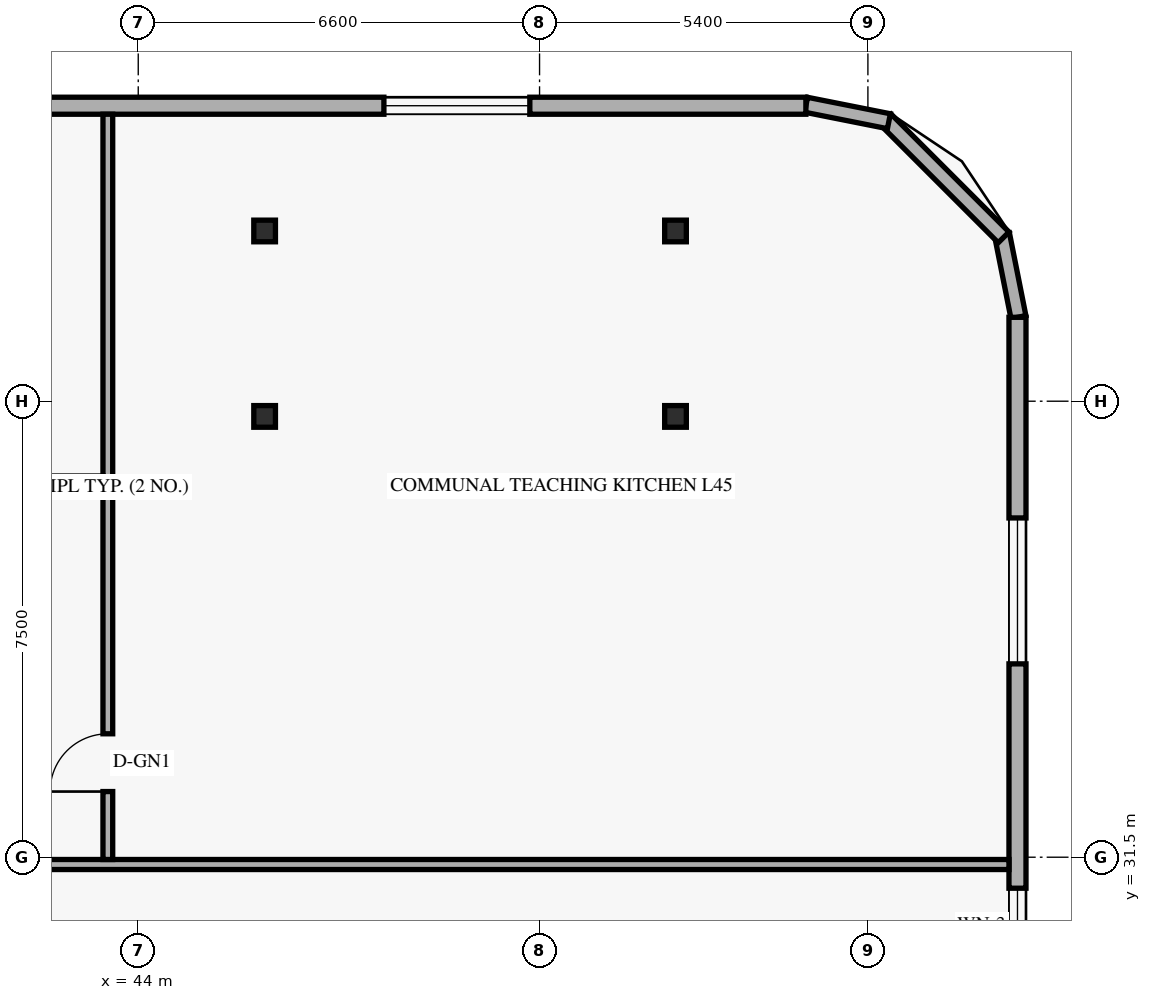
"""IFC4 building model, lengths in metres.
Left out: names, types, materials, properties, quantities, classifications, styles, units other than length and angle.
Written with IfcOpenShell. Run it as: python <this file> out.ifc"""

import sys

from ifc_helpers import new_model, si_unit, direction, frame, frame_2d, origin, origin_2d, place, context, subcontext, project, spatial, rectangle, hollow_rectangle, extrude, element, fill, save


model = new_model("IFC4")
c1 = context("Model", 3, precision=1e-05, world=origin(), true_north=direction((0.0, 1.0)))
c2 = subcontext(c1, "Body", "Model", "MODEL_VIEW")
j1 = project(units=[si_unit("LENGTHUNIT", "METRE"), si_unit("PLANEANGLEUNIT", "RADIAN")], contexts=[c1])
p1 = place(None, origin())
s1 = spatial("IfcSite", under=j1, at=p1, CompositionType="ELEMENT")
p2 = place(p1, origin())
s2 = spatial("IfcBuilding", under=s1, at=p2, CompositionType="ELEMENT")
p3 = place(p2, frame((0.0, 0.0, 173.4)))
s3 = spatial("IfcBuildingStorey", under=s2, at=p3, CompositionType="ELEMENT", Elevation=173.4)
for number, where, z_axis, x_axis in (
    (1, (46.005, 38.75, 0.0), (0.035, 0.0, 0.999), (0.0, 1.0, 0.0)),
    (2, (46.005, 41.8, 0.0), (0.035, 0.0, 0.999), (0.0, 1.0, 0.0)),
):
    element("IfcColumn", number, at=place(p3, frame(where, z_axis=z_axis, x_axis=x_axis)), inside=s3, PredefinedType="COLUMN", context=c2, shape_type="SweptSolid", body=[
        extrude(hollow_rectangle(XDim=0.356, YDim=0.356, WallThickness=0.016, at=origin_2d()), origin(), (0.0, 0.0, 1.0), 4.203),
    ])
for number, where, z_axis, x_axis in (
    (3, (52.714, 38.75, 0.0), (0.058, 0.0, 0.998), (0.0, 1.0, 0.0)),
    (4, (52.714, 41.8, 0.0), (0.058, 0.0, 0.998), (0.0, 1.0, 0.0)),
):
    element("IfcColumn", number, at=place(p3, frame(where, z_axis=z_axis, x_axis=x_axis)), inside=s3, PredefinedType="COLUMN", context=c2, shape_type="SweptSolid", body=[
        extrude(hollow_rectangle(XDim=0.356, YDim=0.356, WallThickness=0.016, at=origin_2d()), origin(), (0.0, 0.0, 1.0), 4.207),
    ])
p4 = place(p3, frame((58.476, 40.384, 0.0), z_axis=(0.0, 0.0, 1.0), x_axis=(-0.19496651342, 0.980809899341, 0.0)))
e5 = element("IfcWall", 5, at=p4, inside=s3, PredefinedType="SOLIDWALL", context=c2, shape_type="SweptSolid", body=[
    extrude(rectangle(XDim=1.389, YDim=0.25, at=frame_2d((0.694, 0.0))), origin(), (0.0, 0.0, 1.0), 3.96),
])
p5 = place(p3, frame((58.232, 41.695, 0.0), z_axis=(0.0, 0.0, 1.0), x_axis=(-0.707106781187, 0.707106781187, 0.0)))
e6 = element("IfcWall", 6, at=p5, inside=s3, PredefinedType="SOLIDWALL", context=c2, shape_type="SweptSolid", body=[
    extrude(rectangle(XDim=2.739, YDim=0.25, at=frame_2d((1.37, 0.0))), origin(), (0.0, 0.0, 1.0), 3.96),
])
p6 = place(p3, frame((56.345, 43.605, 0.0), z_axis=(0.0, 0.0, 1.0), x_axis=(-0.980809899341, 0.19496651342, 0.0)))
e7 = element("IfcWall", 7, at=p6, inside=s3, PredefinedType="SOLIDWALL", context=c2, shape_type="SweptSolid", body=[
    extrude(rectangle(XDim=1.389, YDim=0.25, at=frame_2d((0.694, 0.0))), origin(), (0.0, 0.0, 1.0), 3.96),
])
p7 = place(p3, frame((58.46, 29.4, 0.0), z_axis=(0.0, 0.0, 1.0), x_axis=(0.0, 1.0, 0.0)))
e8 = element("IfcWall", 8, at=p7, inside=s3, PredefinedType="SOLIDWALL", context=c2, shape_type="SweptSolid", body=[
    extrude(rectangle(XDim=10.98, YDim=0.28, at=frame_2d((5.49, 0.0))), origin(), (0.0, 0.0, 1.0), 3.96),
])
p8 = place(p7, frame((0.39, 0.0, 0.85)))
e9 = element("IfcOpeningElement", 9, at=p8, cuts=e8, PredefinedType="OPENING", context=c2, shape_type="SweptSolid", body=[
    extrude(rectangle(XDim=1.2, YDim=1.5, at=frame_2d((0.6, 0.75))), frame((0.0, 0.15, 0.0), z_axis=(0.0, -1.0, 0.0), x_axis=(1.0, 0.0, 0.0)), (0.0, 0.0, 1.0), 0.3),
])
p9 = place(p7, frame((5.28, 0.0, 0.85)))
e10 = element("IfcOpeningElement", 10, at=p9, cuts=e8, PredefinedType="OPENING", context=c2, shape_type="SweptSolid", body=[
    extrude(rectangle(XDim=2.4, YDim=1.9, at=frame_2d((1.2, 0.95))), frame((0.0, 0.15, 0.0), z_axis=(0.0, -1.0, 0.0), x_axis=(1.0, 0.0, 0.0)), (0.0, 0.0, 1.0), 0.3),
])
p10 = place(p3, frame((54.98, 43.86, 0.0), z_axis=(0.0, 0.0, 1.0), x_axis=(-1.0, 0.0, 0.0)))
e11 = element("IfcWall", 11, at=p10, inside=s3, PredefinedType="SOLIDWALL", context=c2, shape_type="SweptSolid", body=[
    extrude(rectangle(XDim=20.58, YDim=0.28, at=frame_2d((10.29, 0.0))), origin(), (0.0, 0.0, 1.0), 3.96),
])
p11 = place(p10, frame((17.88, 0.0, 0.85)))
e12 = element("IfcOpeningElement", 12, at=p11, cuts=e11, PredefinedType="OPENING", context=c2, shape_type="SweptSolid", body=[
    extrude(rectangle(XDim=2.4, YDim=1.9, at=frame_2d((1.2, 0.95))), frame((0.0, 0.15, 0.0), z_axis=(0.0, -1.0, 0.0), x_axis=(1.0, 0.0, 0.0)), (0.0, 0.0, 1.0), 0.3),
])
p12 = place(p10, frame((13.33, 0.0, 0.85)))
e13 = element("IfcOpeningElement", 13, at=p12, cuts=e11, PredefinedType="OPENING", context=c2, shape_type="SweptSolid", body=[
    extrude(rectangle(XDim=2.4, YDim=1.9, at=frame_2d((1.2, 0.95))), frame((0.0, 0.15, 0.0), z_axis=(0.0, -1.0, 0.0), x_axis=(1.0, 0.0, 0.0)), (0.0, 0.0, 1.0), 0.3),
])
p13 = place(p10, frame((4.54, 0.0, 0.85)))
e14 = element("IfcOpeningElement", 14, at=p13, cuts=e11, PredefinedType="OPENING", context=c2, shape_type="SweptSolid", body=[
    extrude(rectangle(XDim=2.4, YDim=1.9, at=frame_2d((1.2, 0.95))), frame((0.0, 0.15, 0.0), z_axis=(0.0, -1.0, 0.0), x_axis=(1.0, 0.0, 0.0)), (0.0, 0.0, 1.0), 0.3),
])
p14 = place(p3, frame((37.49, 31.38, 0.0), z_axis=(0.0, 0.0, 1.0), x_axis=(1.0, 0.0, 0.0)))
e15 = element("IfcWall", 15, at=p14, inside=s3, PredefinedType="PARTITIONING", context=c2, shape_type="SweptSolid", body=[
    extrude(rectangle(XDim=20.83, YDim=0.165, at=frame_2d((10.415, 0.0))), origin(), (0.0, 0.0, 1.0), 3.33),
])
p15 = place(p3, frame((43.5, 31.462, 0.0), z_axis=(0.0, 0.0, 1.0), x_axis=(0.0, 1.0, 0.0)))
e16 = element("IfcWall", 16, at=p15, inside=s3, PredefinedType="PLUMBINGWALL", context=c2, shape_type="SweptSolid", body=[
    extrude(rectangle(XDim=12.258, YDim=0.16, at=frame_2d((6.129, 0.0))), origin(), (0.0, 0.0, 1.0), 3.33),
])
p16 = place(p15, frame((1.117, 0.0, 0.0)))
e17 = element("IfcOpeningElement", 17, at=p16, cuts=e16, PredefinedType="OPENING", context=c2, shape_type="SweptSolid", body=[
    extrude(rectangle(XDim=0.95, YDim=2.15, at=frame_2d((0.475, 1.075))), frame((0.0, 0.09, 0.0), z_axis=(0.0, -1.0, 0.0), x_axis=(1.0, 0.0, 0.0)), (0.0, 0.0, 1.0), 0.18),
])
p17 = place(p3, frame((37.49, 37.69, 0.0), z_axis=(0.0, 0.0, 1.0), x_axis=(1.0, 0.0, 0.0)))
e18 = element("IfcWall", 18, at=p17, inside=s3, PredefinedType="PLUMBINGWALL", context=c2, shape_type="SweptSolid", body=[
    extrude(rectangle(XDim=5.93, YDim=0.16, at=frame_2d((2.965, 0.0))), origin(), (0.0, 0.0, 1.0), 3.96),
])
p18 = place(p8, origin())
e19 = element("IfcWindow", 19, at=p18, inside=s3, PartitioningType="SINGLE_PANEL", PredefinedType="WINDOW", context=c2, shape_type="SweptSolid", body=[
    extrude(rectangle(XDim=1.2, YDim=1.5, at=frame_2d((0.6, 0.75))), frame((0.0, 0.03, 0.0), z_axis=(0.0, -1.0, 0.0), x_axis=(1.0, 0.0, 0.0)), (0.0, 0.0, 1.0), 0.06),
])
fill(e9, e19)
p19 = place(p9, origin())
e20 = element("IfcWindow", 20, at=p19, inside=s3, PartitioningType="SINGLE_PANEL", PredefinedType="WINDOW", context=c2, shape_type="SweptSolid", body=[
    extrude(rectangle(XDim=2.4, YDim=1.9, at=frame_2d((1.2, 0.95))), frame((0.0, 0.03, 0.0), z_axis=(0.0, -1.0, 0.0), x_axis=(1.0, 0.0, 0.0)), (0.0, 0.0, 1.0), 0.06),
])
fill(e10, e20)
p20 = place(p13, origin())
e21 = element("IfcWindow", 21, at=p20, inside=s3, PartitioningType="SINGLE_PANEL", PredefinedType="WINDOW", context=c2, shape_type="SweptSolid", body=[
    extrude(rectangle(XDim=2.4, YDim=1.9, at=frame_2d((1.2, 0.95))), frame((0.0, 0.03, 0.0), z_axis=(0.0, -1.0, 0.0), x_axis=(1.0, 0.0, 0.0)), (0.0, 0.0, 1.0), 0.06),
])
fill(e14, e21)
p21 = place(p16, origin())
e22 = element("IfcDoor", 22, at=p21, inside=s3, OperationType="SINGLE_SWING_LEFT", PredefinedType="DOOR", context=c2, shape_type="SweptSolid", body=[
    extrude(rectangle(XDim=0.95, YDim=2.15, at=frame_2d((0.475, 1.075))), frame((0.0, 0.025, 0.0), z_axis=(0.0, -1.0, 0.0), x_axis=(1.0, 0.0, 0.0)), (0.0, 0.0, 1.0), 0.05),
])
fill(e17, e22)
save(model, sys.argv[1])
